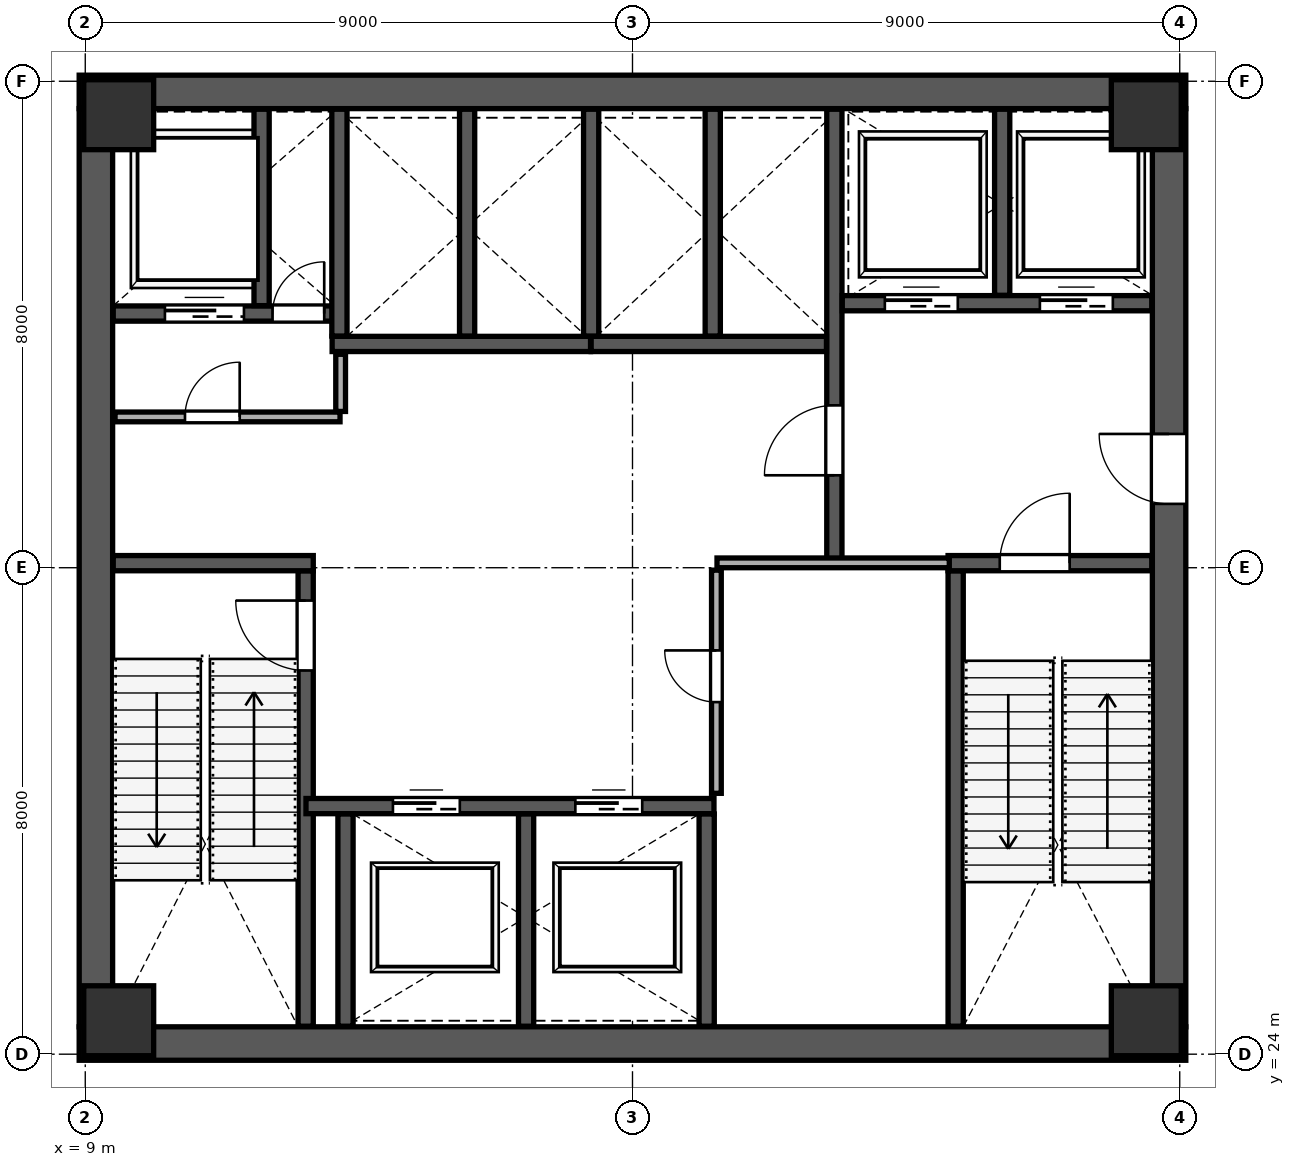
"""IFC4 building model, lengths in metres.
Left out: names, types, materials, properties, quantities, classifications, styles, units other than length and angle.
Written with IfcOpenShell. Run it as: python <this file> out.ifc"""

import sys

from ifc_helpers import new_model, si_unit, direction, frame, frame_2d, origin, origin_2d, place, context, subcontext, project, spatial, rectangle, extrude, source, transform, mapped, element, fill, save


model = new_model("IFC4")
c1 = context("Model", 3, precision=1e-05, world=origin(), true_north=direction((0.0, 1.0)))
c2 = subcontext(c1, "Body", "Model", "MODEL_VIEW")
j1 = project(units=[si_unit("LENGTHUNIT", "METRE"), si_unit("PLANEANGLEUNIT", "RADIAN")], contexts=[c1])
p1 = place(None, origin())
s1 = spatial("IfcSite", under=j1, at=p1, CompositionType="ELEMENT")
p2 = place(p1, origin())
s2 = spatial("IfcBuilding", under=s1, at=p2, CompositionType="ELEMENT")
p3 = place(p2, frame((0.0, 0.0, 61.6)))
s3 = spatial("IfcBuildingStorey", under=s2, at=p3, CompositionType="ELEMENT", Elevation=61.6)
m1 = source(origin(), c2, "Body", "SweptSolid", [
    extrude(rectangle(XDim=1.15, YDim=1.15, at=origin_2d()), origin(), (0.0, 0.0, 1.0), 4.798),
])
for number, where, z_axis, x_axis in (
    (1, (9.55, 24.55, 0.001), (0.0, 0.0, 1.0), (1.0, 0.0, 0.0)),
    (2, (26.45, 24.55, 0.001), (0.0, 0.0, 1.0), (1.0, 0.0, 0.0)),
    (3, (9.55, 39.45, 0.001), (0.0, 0.0, 1.0), (1.0, 0.0, 0.0)),
    (4, (26.45, 39.45, 0.001), (0.0, 0.0, 1.0), (1.0, 0.0, 0.0)),
):
    element("IfcColumn", number, at=place(p3, frame(where, z_axis=z_axis, x_axis=x_axis)), inside=s3, PredefinedType="COLUMN", context=c2, shape_type="MappedRepresentation", body=[
        mapped(m1, transform((0.0, 0.0, 0.0), scale=1.0)),
    ])
p4 = place(p3, frame((9.175, 24.45, 0.0), z_axis=(0.0, 0.0, 1.0), x_axis=(0.0, 1.0, 0.0)))
e5 = element("IfcWall", 5, at=p4, inside=s3, PredefinedType="SHEAR", context=c2, shape_type="SweptSolid", body=[
    extrude(rectangle(XDim=15.1, YDim=0.55, at=frame_2d((7.55, 0.0))), origin(), (0.0, 0.0, 1.0), 4.56),
])
p5 = place(p3, frame((26.825, 24.45, 0.0), z_axis=(0.0, 0.0, 1.0), x_axis=(0.0, 1.0, 0.0)))
e6 = element("IfcWall", 6, at=p5, inside=s3, PredefinedType="SHEAR", context=c2, shape_type="SweptSolid", body=[
    extrude(rectangle(XDim=15.1, YDim=0.55, at=frame_2d((7.55, 0.0))), origin(), (0.0, 0.0, 1.0), 4.56),
])
p6 = place(p5, frame((8.6, 0.0, 0.0)))
e7 = element("IfcOpeningElement", 7, at=p6, cuts=e6, PredefinedType="OPENING", context=c2, shape_type="SweptSolid", body=[
    extrude(rectangle(XDim=1.15, YDim=2.2, at=frame_2d((0.575, 1.1))), frame((0.0, 0.285, 0.0), z_axis=(0.0, -1.0, 0.0), x_axis=(1.0, 0.0, 0.0)), (0.0, 0.0, 1.0), 0.57),
])
for number, where, z_axis, x_axis in (
    (8, (8.9, 24.175, 0.0), (0.0, 0.0, 1.0), (1.0, 0.0, 0.0)),
    (9, (8.9, 39.825, 0.0), (0.0, 0.0, 1.0), (1.0, 0.0, 0.0)),
):
    element("IfcWall", number, at=place(p3, frame(where, z_axis=z_axis, x_axis=x_axis)), inside=s3, PredefinedType="SHEAR", context=c2, shape_type="SweptSolid", body=[
        extrude(rectangle(XDim=18.2, YDim=0.55, at=frame_2d((9.1, 0.0))), origin(), (0.0, 0.0, 1.0), 4.56),
    ])
p7 = place(p3, frame((12.625, 24.46, 0.0), z_axis=(0.0, 0.0, 1.0), x_axis=(0.0, 1.0, 0.0)))
e10 = element("IfcWall", 10, at=p7, inside=s3, PredefinedType="SHEAR", context=c2, shape_type="SweptSolid", body=[
    extrude(rectangle(XDim=7.49, YDim=0.25, at=frame_2d((3.745, 0.0))), origin(), (0.0, 0.0, 1.0), 4.56),
])
p8 = place(p7, frame((5.85, 0.0, 0.0)))
e11 = element("IfcOpeningElement", 11, at=p8, cuts=e10, PredefinedType="OPENING", context=c2, shape_type="SweptSolid", body=[
    extrude(rectangle(XDim=1.15, YDim=2.2, at=frame_2d((0.575, 1.1))), frame((0.0, 0.135, 0.0), z_axis=(0.0, -1.0, 0.0), x_axis=(1.0, 0.0, 0.0)), (0.0, 0.0, 1.0), 0.27),
])
p9 = place(p3, frame((9.46, 32.075, 0.0), z_axis=(0.0, 0.0, 1.0), x_axis=(1.0, 0.0, 0.0)))
e12 = element("IfcWall", 12, at=p9, inside=s3, PredefinedType="SHEAR", context=c2, shape_type="SweptSolid", body=[
    extrude(rectangle(XDim=3.29, YDim=0.25, at=frame_2d((1.645, 0.0))), origin(), (0.0, 0.0, 1.0), 4.56),
])
p10 = place(p3, frame((23.315, 24.46, 0.0), z_axis=(0.0, 0.0, 1.0), x_axis=(0.0, 1.0, 0.0)))
e13 = element("IfcWall", 13, at=p10, inside=s3, PredefinedType="SHEAR", context=c2, shape_type="SweptSolid", body=[
    extrude(rectangle(XDim=7.49, YDim=0.25, at=frame_2d((3.745, 0.0))), origin(), (0.0, 0.0, 1.0), 4.56),
])
p11 = place(p3, frame((23.19, 32.075, 0.0), z_axis=(0.0, 0.0, 1.0), x_axis=(1.0, 0.0, 0.0)))
e14 = element("IfcWall", 14, at=p11, inside=s3, PredefinedType="SHEAR", context=c2, shape_type="SweptSolid", body=[
    extrude(rectangle(XDim=3.35, YDim=0.25, at=frame_2d((1.675, 0.0))), origin(), (0.0, 0.0, 1.0), 4.56),
])
p12 = place(p11, frame((0.85, 0.0, 0.0)))
e15 = element("IfcOpeningElement", 15, at=p12, cuts=e14, PredefinedType="OPENING", context=c2, shape_type="SweptSolid", body=[
    extrude(rectangle(XDim=1.15, YDim=2.2, at=frame_2d((0.575, 1.1))), frame((0.0, 0.135, 0.0), z_axis=(0.0, -1.0, 0.0), x_axis=(1.0, 0.0, 0.0)), (0.0, 0.0, 1.0), 0.27),
])
p13 = place(p3, frame((21.32, 32.12, 0.0), z_axis=(0.0, 0.0, 1.0), x_axis=(0.0, 1.0, 0.0)))
e16 = element("IfcWall", 16, at=p13, inside=s3, PredefinedType="SHEAR", context=c2, shape_type="SweptSolid", body=[
    extrude(rectangle(XDim=7.42, YDim=0.25, at=frame_2d((3.71, 0.0))), origin(), (0.0, 0.0, 1.0), 4.56),
])
p14 = place(p13, frame((1.4, 0.0, 0.0)))
e17 = element("IfcOpeningElement", 17, at=p14, cuts=e16, PredefinedType="OPENING", context=c2, shape_type="SweptSolid", body=[
    extrude(rectangle(XDim=1.15, YDim=2.2, at=frame_2d((0.575, 1.1))), frame((0.0, 0.135, 0.0), z_axis=(0.0, -1.0, 0.0), x_axis=(1.0, 0.0, 0.0)), (0.0, 0.0, 1.0), 0.27),
])
p15 = place(p3, frame((9.46, 36.18, 0.0), z_axis=(0.0, 0.0, 1.0), x_axis=(1.0, 0.0, 0.0)))
e18 = element("IfcWall", 18, at=p15, inside=s3, PredefinedType="SHEAR", context=c2, shape_type="SweptSolid", body=[
    extrude(rectangle(XDim=3.79, YDim=0.25, at=frame_2d((1.895, 0.0))), origin(), (0.0, 0.0, 1.0), 4.56),
])
p16 = place(p15, frame((2.62, 0.0, 0.0)))
e19 = element("IfcOpeningElement", 19, at=p16, cuts=e18, PredefinedType="OPENING", context=c2, shape_type="SweptSolid", body=[
    extrude(rectangle(XDim=0.85, YDim=2.1, at=frame_2d((0.425, 1.05))), frame((0.0, 0.135, 0.0), z_axis=(0.0, -1.0, 0.0), x_axis=(1.0, 0.0, 0.0)), (0.0, 0.0, 1.0), 0.27),
])
p17 = place(p15, frame((0.85, 0.0, 0.0)))
e20 = element("IfcOpeningElement", 20, at=p17, cuts=e18, PredefinedType="OPENING", context=c2, shape_type="SweptSolid", body=[
    extrude(rectangle(XDim=1.3, YDim=2.25, at=frame_2d((0.65, 1.125))), frame((0.0, 0.135, 0.0), z_axis=(0.0, -1.0, 0.0), x_axis=(1.0, 0.0, 0.0)), (0.0, 0.0, 1.0), 0.27),
])
p18 = place(p3, frame((11.9, 36.31, 0.0), z_axis=(0.0, 0.0, 1.0), x_axis=(0.0, 1.0, 0.0)))
e21 = element("IfcWall", 21, at=p18, inside=s3, PredefinedType="SHEAR", context=c2, shape_type="SweptSolid", body=[
    extrude(rectangle(XDim=3.23, YDim=0.25, at=frame_2d((1.615, 0.0))), origin(), (0.0, 0.0, 1.0), 4.56),
])
p19 = place(p3, frame((21.45, 36.35, 0.0), z_axis=(0.0, 0.0, 1.0), x_axis=(1.0, 0.0, 0.0)))
e22 = element("IfcWall", 22, at=p19, inside=s3, PredefinedType="SHEAR", context=c2, shape_type="SweptSolid", body=[
    extrude(rectangle(XDim=5.09, YDim=0.25, at=frame_2d((2.545, 0.0))), origin(), (0.0, 0.0, 1.0), 4.56),
])
p20 = place(p19, frame((0.7, 0.0, 0.0)))
e23 = element("IfcOpeningElement", 23, at=p20, cuts=e22, PredefinedType="OPENING", context=c2, shape_type="SweptSolid", body=[
    extrude(rectangle(XDim=1.2, YDim=2.2, at=frame_2d((0.6, 1.1))), frame((0.0, 0.135, 0.0), z_axis=(0.0, -1.0, 0.0), x_axis=(1.0, 0.0, 0.0)), (0.0, 0.0, 1.0), 0.27),
])
p21 = place(p19, frame((3.25, 0.0, 0.0)))
e24 = element("IfcOpeningElement", 24, at=p21, cuts=e22, PredefinedType="OPENING", context=c2, shape_type="SweptSolid", body=[
    extrude(rectangle(XDim=1.2, YDim=2.2, at=frame_2d((0.6, 1.1))), frame((0.0, 0.135, 0.0), z_axis=(0.0, -1.0, 0.0), x_axis=(1.0, 0.0, 0.0)), (0.0, 0.0, 1.0), 0.27),
])
p22 = place(p3, frame((24.08, 36.48, 0.0), z_axis=(0.0, 0.0, 1.0), x_axis=(0.0, 1.0, 0.0)))
e25 = element("IfcWall", 25, at=p22, inside=s3, PredefinedType="SHEAR", context=c2, shape_type="SweptSolid", body=[
    extrude(rectangle(XDim=3.06, YDim=0.25, at=frame_2d((1.53, 0.0))), origin(), (0.0, 0.0, 1.0), 4.56),
])
p23 = place(p3, frame((12.63, 28.08, 0.0), z_axis=(0.0, 0.0, 1.0), x_axis=(1.0, 0.0, 0.0)))
e26 = element("IfcWall", 26, at=p23, inside=s3, PredefinedType="SHEAR", context=c2, shape_type="SweptSolid", body=[
    extrude(rectangle(XDim=6.71, YDim=0.25, at=frame_2d((3.355, 0.0))), origin(), (0.0, 0.0, 1.0), 4.56),
])
p24 = place(p23, frame((1.43, 0.0, 0.0)))
e27 = element("IfcOpeningElement", 27, at=p24, cuts=e26, PredefinedType="OPENING", context=c2, shape_type="SweptSolid", body=[
    extrude(rectangle(XDim=1.1, YDim=2.2, at=frame_2d((0.55, 1.1))), frame((0.0, 0.135, 0.0), z_axis=(0.0, -1.0, 0.0), x_axis=(1.0, 0.0, 0.0)), (0.0, 0.0, 1.0), 0.27),
])
p25 = place(p23, frame((4.43, 0.0, 0.0)))
e28 = element("IfcOpeningElement", 28, at=p25, cuts=e26, PredefinedType="OPENING", context=c2, shape_type="SweptSolid", body=[
    extrude(rectangle(XDim=1.1, YDim=2.2, at=frame_2d((0.55, 1.1))), frame((0.0, 0.135, 0.0), z_axis=(0.0, -1.0, 0.0), x_axis=(1.0, 0.0, 0.0)), (0.0, 0.0, 1.0), 0.27),
])
for number, where, z_axis, x_axis in (
    (29, (13.28, 24.46, 0.0), (0.0, 0.0, 1.0), (0.0, 1.0, 0.0)),
    (30, (16.25, 24.46, 0.0), (0.0, 0.0, 1.0), (0.0, 1.0, 0.0)),
    (31, (19.22, 24.46, 0.0), (0.0, 0.0, 1.0), (0.0, 1.0, 0.0)),
):
    element("IfcWall", number, at=place(p3, frame(where, z_axis=z_axis, x_axis=x_axis)), inside=s3, PredefinedType="SHEAR", context=c2, shape_type="SweptSolid", body=[
        extrude(rectangle(XDim=3.49, YDim=0.25, at=frame_2d((1.745, 0.0))), origin(), (0.0, 0.0, 1.0), 4.56),
    ])
p26 = place(p3, frame((13.06, 35.68, 0.0), z_axis=(0.0, 0.0, 1.0), x_axis=(1.0, 0.0, 0.0)))
e32 = element("IfcWall", 32, at=p26, inside=s3, PredefinedType="SHEAR", context=c2, shape_type="SweptSolid", body=[
    extrude(rectangle(XDim=4.25, YDim=0.25, at=frame_2d((2.125, 0.0))), origin(), (0.0, 0.0, 1.0), 4.56),
])
for number, where, z_axis, x_axis in (
    (33, (13.18, 35.81, 0.0), (0.0, 0.0, 1.0), (0.0, 1.0, 0.0)),
    (34, (15.28, 35.81, 0.0), (0.0, 0.0, 1.0), (0.0, 1.0, 0.0)),
):
    element("IfcWall", number, at=place(p3, frame(where, z_axis=z_axis, x_axis=x_axis)), inside=s3, PredefinedType="SHEAR", context=c2, shape_type="SweptSolid", body=[
        extrude(rectangle(XDim=3.73, YDim=0.25, at=frame_2d((1.865, 0.0))), origin(), (0.0, 0.0, 1.0), 4.56),
    ])
p27 = place(p3, frame((17.32, 35.68, 0.0), z_axis=(0.0, 0.0, 1.0), x_axis=(1.0, 0.0, 0.0)))
e35 = element("IfcWall", 35, at=p27, inside=s3, PredefinedType="SHEAR", context=c2, shape_type="SweptSolid", body=[
    extrude(rectangle(XDim=3.87, YDim=0.25, at=frame_2d((1.935, 0.0))), origin(), (0.0, 0.0, 1.0), 4.56),
])
for number, where, z_axis, x_axis in (
    (36, (17.32, 35.81, 0.0), (0.0, 0.0, 1.0), (0.0, 1.0, 0.0)),
    (37, (19.32, 35.81, 0.0), (0.0, 0.0, 1.0), (0.0, 1.0, 0.0)),
):
    element("IfcWall", number, at=place(p3, frame(where, z_axis=z_axis, x_axis=x_axis)), inside=s3, PredefinedType="SHEAR", context=c2, shape_type="SweptSolid", body=[
        extrude(rectangle(XDim=3.73, YDim=0.25, at=frame_2d((1.865, 0.0))), origin(), (0.0, 0.0, 1.0), 4.56),
    ])
p28 = place(p3, frame((9.49, 34.48, 0.0), z_axis=(0.0, 0.0, 1.0), x_axis=(1.0, 0.0, 0.0)))
e38 = element("IfcWall", 38, at=p28, inside=s3, PredefinedType="PARTITIONING", context=c2, shape_type="SweptSolid", body=[
    extrude(rectangle(XDim=3.7, YDim=0.16, at=frame_2d((1.85, 0.0))), origin(), (0.0, 0.0, 1.0), 4.56),
])
p29 = place(p28, frame((1.15, 0.0, 0.0)))
e39 = element("IfcOpeningElement", 39, at=p29, cuts=e38, PredefinedType="OPENING", context=c2, shape_type="SweptSolid", body=[
    extrude(rectangle(XDim=0.9, YDim=2.15, at=frame_2d((0.45, 1.075))), frame((0.0, 0.09, 0.0), z_axis=(0.0, -1.0, 0.0), x_axis=(1.0, 0.0, 0.0)), (0.0, 0.0, 1.0), 0.18),
])
p30 = place(p3, frame((13.2, 34.57, 0.0), z_axis=(0.0, 0.0, 1.0), x_axis=(0.0, 1.0, 0.0)))
e40 = element("IfcWall", 40, at=p30, inside=s3, PredefinedType="PARTITIONING", context=c2, shape_type="SweptSolid", body=[
    extrude(rectangle(XDim=0.94, YDim=0.16, at=frame_2d((0.47, 0.0))), origin(), (0.0, 0.0, 1.0), 4.56),
])
p31 = place(p3, frame((19.39, 32.08, 0.0), z_axis=(0.0, 0.0, 1.0), x_axis=(1.0, 0.0, 0.0)))
e41 = element("IfcWall", 41, at=p31, inside=s3, PredefinedType="PARTITIONING", context=c2, shape_type="SweptSolid", body=[
    extrude(rectangle(XDim=3.82, YDim=0.16, at=frame_2d((1.91, 0.0))), origin(), (0.0, 0.0, 1.0), 4.56),
])
p32 = place(p3, frame((19.38, 28.29, 0.0), z_axis=(0.0, 0.0, 1.0), x_axis=(0.0, 1.0, 0.0)))
e42 = element("IfcWall", 42, at=p32, inside=s3, PredefinedType="PARTITIONING", context=c2, shape_type="SweptSolid", body=[
    extrude(rectangle(XDim=3.67, YDim=0.16, at=frame_2d((1.835, 0.0))), origin(), (0.0, 0.0, 1.0), 4.56),
])
p33 = place(p32, frame((1.5, 0.0, 0.0)))
e43 = element("IfcOpeningElement", 43, at=p33, cuts=e42, PredefinedType="OPENING", context=c2, shape_type="SweptSolid", body=[
    extrude(rectangle(XDim=0.85, YDim=2.1, at=frame_2d((0.425, 1.05))), frame((0.0, 0.09, 0.0), z_axis=(0.0, -1.0, 0.0), x_axis=(1.0, 0.0, 0.0)), (0.0, 0.0, 1.0), 0.18),
])
p34 = place(p3, frame((27.595, 13.022, 0.0), z_axis=(0.0, 0.0, 1.0), x_axis=(0.130532558102, 0.991444023269, 0.0)))
e44 = element("IfcWall", 44, at=p34, inside=s3, PredefinedType="PARTITIONING", context=c2, shape_type="SweptSolid", body=[
    extrude(rectangle(XDim=14.08, YDim=0.16, at=frame_2d((7.04, 0.0))), origin(), (0.0, 0.0, 1.0), 4.56),
])
m2 = source(origin(), c2, "Body", "SweptSolid", [
    extrude(rectangle(XDim=1.15, YDim=2.2, at=frame_2d((0.575, 1.1))), frame((0.0, 0.025, 0.0), z_axis=(0.0, -1.0, 0.0), x_axis=(1.0, 0.0, 0.0)), (0.0, 0.0, 1.0), 0.05),
])
p35 = place(p8, origin())
e45 = element("IfcDoor", 45, at=p35, inside=s3, OperationType="SINGLE_SWING_RIGHT", PredefinedType="DOOR", context=c2, shape_type="MappedRepresentation", body=[
    mapped(m2, transform((0.0, 0.0, 0.0), scale=1.0)),
])
fill(e11, e45)
m3 = source(origin(), c2, "Body", "SweptSolid", [
    extrude(rectangle(XDim=1.15, YDim=2.2, at=frame_2d((0.575, 1.1))), frame((0.0, 0.025, 0.0), z_axis=(0.0, -1.0, 0.0), x_axis=(1.0, 0.0, 0.0)), (0.0, 0.0, 1.0), 0.05),
])
p36 = place(p14, origin())
e46 = element("IfcDoor", 46, at=p36, inside=s3, OperationType="SINGLE_SWING_LEFT", PredefinedType="DOOR", context=c2, shape_type="MappedRepresentation", body=[
    mapped(m3, transform((0.0, 0.0, 0.0), scale=1.0)),
])
fill(e17, e46)
p37 = place(p12, origin())
e47 = element("IfcDoor", 47, at=p37, inside=s3, OperationType="SINGLE_SWING_RIGHT", PredefinedType="DOOR", context=c2, shape_type="MappedRepresentation", body=[
    mapped(m2, transform((0.0, 0.0, 0.0), scale=1.0)),
])
fill(e15, e47)
p38 = place(p6, origin())
e48 = element("IfcDoor", 48, at=p38, inside=s3, OperationType="SINGLE_SWING_RIGHT", PredefinedType="DOOR", context=c2, shape_type="MappedRepresentation", body=[
    mapped(m3, transform((0.0, 0.0, 0.0), scale=1.0)),
])
fill(e7, e48)
m4 = source(origin(), c2, "Body", "SweptSolid", [
    extrude(rectangle(XDim=0.85, YDim=2.1, at=frame_2d((0.425, 1.05))), frame((0.0, 0.025, 0.0), z_axis=(0.0, -1.0, 0.0), x_axis=(1.0, 0.0, 0.0)), (0.0, 0.0, 1.0), 0.05),
])
p39 = place(p16, origin())
e49 = element("IfcDoor", 49, at=p39, inside=s3, OperationType="SINGLE_SWING_RIGHT", PredefinedType="DOOR", context=c2, shape_type="MappedRepresentation", body=[
    mapped(m4, transform((0.0, 0.0, 0.0), scale=1.0)),
])
fill(e19, e49)
m5 = source(origin(), c2, "Body", "SweptSolid", [
    extrude(rectangle(XDim=1.1, YDim=2.2, at=frame_2d((0.55, 1.1))), frame((0.0, 0.025, 0.0), z_axis=(0.0, -1.0, 0.0), x_axis=(1.0, 0.0, 0.0)), (0.0, 0.0, 1.0), 0.05),
])
p40 = place(p24, origin())
e50 = element("IfcDoor", 50, at=p40, inside=s3, OperationType="SLIDING_TO_LEFT", PredefinedType="DOOR", context=c2, shape_type="MappedRepresentation", body=[
    mapped(m5, transform((0.0, 0.0, 0.0), scale=1.0)),
])
fill(e27, e50)
p41 = place(p25, origin())
e51 = element("IfcDoor", 51, at=p41, inside=s3, OperationType="SLIDING_TO_RIGHT", PredefinedType="DOOR", context=c2, shape_type="MappedRepresentation", body=[
    mapped(m5, transform((0.0, 0.0, 0.0), scale=1.0)),
])
fill(e28, e51)
m6 = source(origin(), c2, "Body", "SweptSolid", [
    extrude(rectangle(XDim=1.2, YDim=2.2, at=frame_2d((0.6, 1.1))), frame((0.0, 0.025, 0.0), z_axis=(0.0, -1.0, 0.0), x_axis=(1.0, 0.0, 0.0)), (0.0, 0.0, 1.0), 0.05),
])
p42 = place(p20, origin())
e52 = element("IfcDoor", 52, at=p42, inside=s3, OperationType="SLIDING_TO_LEFT", PredefinedType="DOOR", context=c2, shape_type="MappedRepresentation", body=[
    mapped(m6, transform((0.0, 0.0, 0.0), scale=1.0)),
])
fill(e23, e52)
p43 = place(p21, origin())
e53 = element("IfcDoor", 53, at=p43, inside=s3, OperationType="SLIDING_TO_RIGHT", PredefinedType="DOOR", context=c2, shape_type="MappedRepresentation", body=[
    mapped(m6, transform((0.0, 0.0, 0.0), scale=1.0)),
])
fill(e24, e53)
m7 = source(origin(), c2, "Body", "SweptSolid", [
    extrude(rectangle(XDim=1.3, YDim=2.25, at=frame_2d((0.65, 1.125))), frame((0.0, 0.025, 0.0), z_axis=(0.0, -1.0, 0.0), x_axis=(1.0, 0.0, 0.0)), (0.0, 0.0, 1.0), 0.05),
])
p44 = place(p17, origin())
e54 = element("IfcDoor", 54, at=p44, inside=s3, OperationType="SLIDING_TO_LEFT", PredefinedType="DOOR", context=c2, shape_type="MappedRepresentation", body=[
    mapped(m7, transform((0.0, 0.0, 0.0), scale=1.0)),
])
fill(e20, e54)
m8 = source(origin(), c2, "Body", "SweptSolid", [
    extrude(rectangle(XDim=0.9, YDim=2.15, at=frame_2d((0.45, 1.075))), frame((0.0, 0.025, 0.0), z_axis=(0.0, -1.0, 0.0), x_axis=(1.0, 0.0, 0.0)), (0.0, 0.0, 1.0), 0.05),
])
p45 = place(p29, origin())
e55 = element("IfcDoor", 55, at=p45, inside=s3, OperationType="SINGLE_SWING_RIGHT", PredefinedType="DOOR", context=c2, shape_type="MappedRepresentation", body=[
    mapped(m8, transform((0.0, 0.0, 0.0), scale=1.0)),
])
fill(e39, e55)
p46 = place(p33, origin())
e56 = element("IfcDoor", 56, at=p46, inside=s3, OperationType="SINGLE_SWING_RIGHT", PredefinedType="DOOR", context=c2, shape_type="MappedRepresentation", body=[
    mapped(m4, transform((0.0, 0.0, 0.0), scale=1.0)),
])
fill(e43, e56)
save(model, sys.argv[1])
